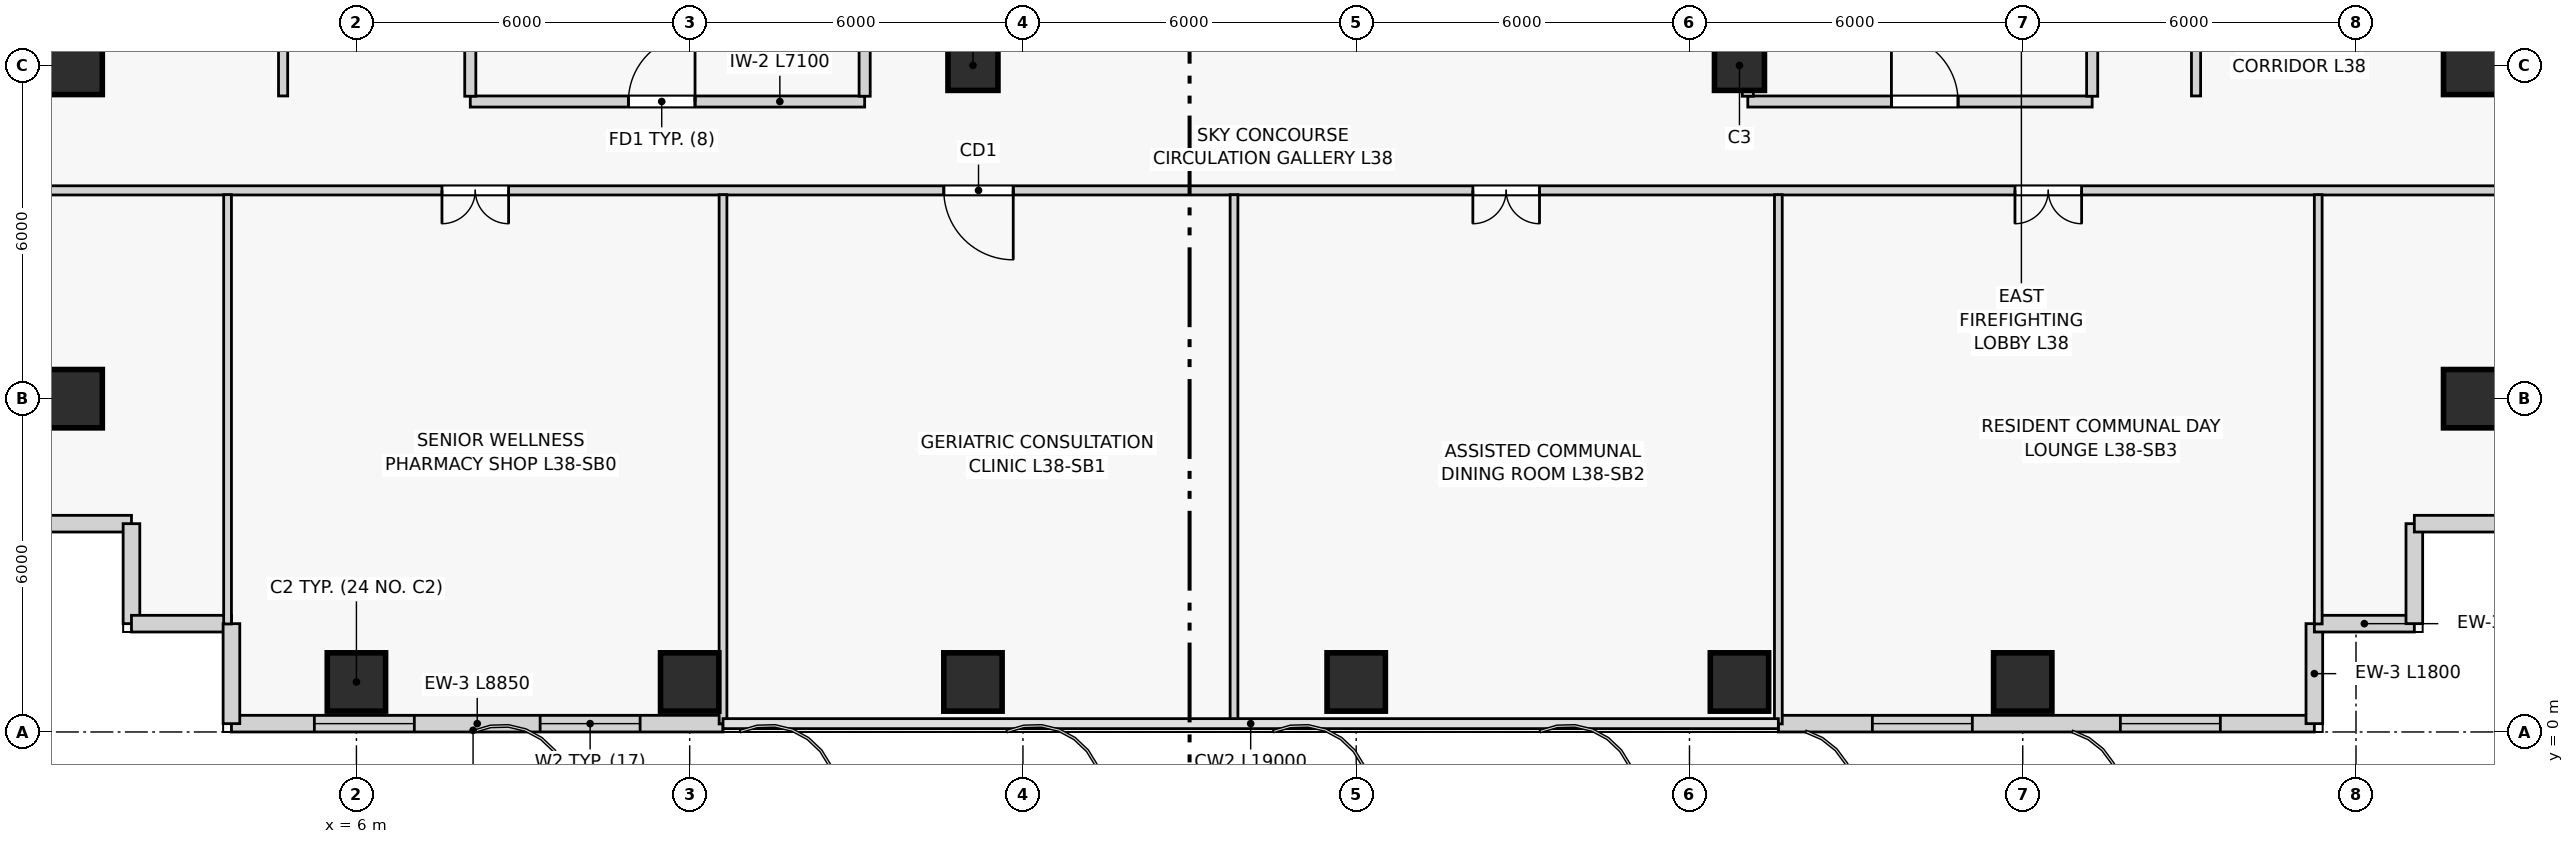
"""IFC4 building model, lengths in metres.
Left out: names, types, materials, properties, quantities, classifications, styles, units other than length and angle.
Written with IfcOpenShell. Run it as: python <this file> out.ifc"""

import sys

from ifc_helpers import new_model, si_unit, direction, frame, frame_2d, origin, origin_2d, place, context, subcontext, project, spatial, rectangle, extrude, source, transform, mapped, element, fill, save


model = new_model("IFC4")
c1 = context("Model", 3, precision=1e-05, world=origin(), true_north=direction((0.0, 1.0)))
c2 = subcontext(c1, "Body", "Model", "MODEL_VIEW")
j1 = project(units=[si_unit("LENGTHUNIT", "METRE"), si_unit("PLANEANGLEUNIT", "RADIAN")], contexts=[c1])
p1 = place(None, origin())
s1 = spatial("IfcSite", under=j1, at=p1, CompositionType="ELEMENT")
p2 = place(p1, origin())
s2 = spatial("IfcBuilding", under=s1, at=p2, CompositionType="ELEMENT")
p3 = place(p2, frame((0.0, 0.0, 144.9)))
s3 = spatial("IfcBuildingStorey", under=s2, at=p3, CompositionType="ELEMENT", Elevation=144.9)
m1 = source(origin(), c2, "Body", "SweptSolid", [
    extrude(rectangle(XDim=1.05, YDim=1.05, at=origin_2d()), origin(), (0.0, 0.0, 1.0), 3.6),
])
for number, where, z_axis, x_axis in (
    (1, (6.0, 0.9, 0.0), (0.0, 0.0, 1.0), (1.0, 0.0, 0.0)),
    (2, (12.0, 0.9, 0.0), (0.0, 0.0, 1.0), (1.0, 0.0, 0.0)),
    (3, (17.1, 0.9, 0.0), (0.0, 0.0, 1.0), (1.0, 0.0, 0.0)),
    (4, (24.0, 0.9, 0.0), (0.0, 0.0, 1.0), (1.0, 0.0, 0.0)),
    (5, (30.9, 0.9, 0.0), (0.0, 0.0, 1.0), (1.0, 0.0, 0.0)),
    (6, (36.0, 0.9, 0.0), (0.0, 0.0, 1.0), (1.0, 0.0, 0.0)),
    (7, (0.9, 6.0, 0.0), (0.0, 0.0, 1.0), (1.0, 0.0, 0.0)),
    (8, (44.1, 6.0, 0.0), (0.0, 0.0, 1.0), (1.0, 0.0, 0.0)),
    (9, (0.9, 12.0, 0.0), (0.0, 0.0, 1.0), (1.0, 0.0, 0.0)),
    (10, (44.1, 12.0, 0.0), (0.0, 0.0, 1.0), (1.0, 0.0, 0.0)),
):
    element("IfcColumn", number, at=place(p3, frame(where, z_axis=z_axis, x_axis=x_axis)), inside=s3, PredefinedType="COLUMN", context=c2, shape_type="MappedRepresentation", body=[
        mapped(m1, transform((0.0, 0.0, 0.0), scale=1.0)),
    ])
m2 = source(origin(), c2, "Body", "SweptSolid", [
    extrude(rectangle(XDim=0.9, YDim=0.9, at=origin_2d()), origin(), (0.0, 0.0, 1.0), 3.6),
])
for number, where, z_axis, x_axis in (
    (11, (17.1, 12.0, 0.0), (0.0, 0.0, 1.0), (1.0, 0.0, 0.0)),
    (12, (30.9, 12.0, 0.0), (0.0, 0.0, 1.0), (1.0, 0.0, 0.0)),
):
    element("IfcColumn", number, at=place(p3, frame(where, z_axis=z_axis, x_axis=x_axis)), inside=s3, PredefinedType="COLUMN", context=c2, shape_type="MappedRepresentation", body=[
        mapped(m2, transform((0.0, 0.0, 0.0), scale=1.0)),
    ])
p4 = place(p3, frame((3.75, 0.15, 0.0), z_axis=(0.0, 0.0, 1.0), x_axis=(1.0, 0.0, 0.0)))
e13 = element("IfcWall", 13, at=p4, inside=s3, PredefinedType="SOLIDWALL", context=c2, shape_type="SweptSolid", body=[
    extrude(rectangle(XDim=8.85, YDim=0.3, at=frame_2d((4.425, 0.0))), origin(), (0.0, 0.0, 1.0), 3.28),
])
p5 = place(p4, frame((1.492, 0.0, 0.8)))
e14 = element("IfcOpeningElement", 14, at=p5, cuts=e13, PredefinedType="OPENING", context=c2, shape_type="SweptSolid", body=[
    extrude(rectangle(XDim=1.8, YDim=2.1, at=frame_2d((0.9, 1.05))), frame((0.0, 0.16, 0.0), z_axis=(0.0, -1.0, 0.0), x_axis=(1.0, 0.0, 0.0)), (0.0, 0.0, 1.0), 0.32),
])
p6 = place(p4, frame((5.558, 0.0, 0.8)))
e15 = element("IfcOpeningElement", 15, at=p6, cuts=e13, PredefinedType="OPENING", context=c2, shape_type="SweptSolid", body=[
    extrude(rectangle(XDim=1.8, YDim=2.1, at=frame_2d((0.9, 1.05))), frame((0.0, 0.16, 0.0), z_axis=(0.0, -1.0, 0.0), x_axis=(1.0, 0.0, 0.0)), (0.0, 0.0, 1.0), 0.32),
])
p7 = place(p3, frame((31.6, 0.15, 0.0), z_axis=(0.0, 0.0, 1.0), x_axis=(1.0, 0.0, 0.0)))
e16 = element("IfcWall", 16, at=p7, inside=s3, PredefinedType="SOLIDWALL", context=c2, shape_type="SweptSolid", body=[
    extrude(rectangle(XDim=9.65, YDim=0.3, at=frame_2d((4.825, 0.0))), origin(), (0.0, 0.0, 1.0), 3.28),
])
p8 = place(p7, frame((1.692, 0.0, 0.8)))
e17 = element("IfcOpeningElement", 17, at=p8, cuts=e16, PredefinedType="OPENING", context=c2, shape_type="SweptSolid", body=[
    extrude(rectangle(XDim=1.8, YDim=2.1, at=frame_2d((0.9, 1.05))), frame((0.0, 0.16, 0.0), z_axis=(0.0, -1.0, 0.0), x_axis=(1.0, 0.0, 0.0)), (0.0, 0.0, 1.0), 0.32),
])
p9 = place(p7, frame((6.157, 0.0, 0.8)))
e18 = element("IfcOpeningElement", 18, at=p9, cuts=e16, PredefinedType="OPENING", context=c2, shape_type="SweptSolid", body=[
    extrude(rectangle(XDim=1.8, YDim=2.1, at=frame_2d((0.9, 1.05))), frame((0.0, 0.16, 0.0), z_axis=(0.0, -1.0, 0.0), x_axis=(1.0, 0.0, 0.0)), (0.0, 0.0, 1.0), 0.32),
])
for number, where, z_axis, x_axis in (
    (19, (41.25, 0.15, 0.0), (0.0, 0.0, 1.0), (0.0, 1.0, 0.0)),
    (20, (41.25, 1.95, 0.0), (0.0, 0.0, 1.0), (1.0, 0.0, 0.0)),
    (21, (43.05, 1.95, 0.0), (0.0, 0.0, 1.0), (0.0, 1.0, 0.0)),
    (22, (43.05, 3.75, 0.0), (0.0, 0.0, 1.0), (1.0, 0.0, 0.0)),
    (23, (0.15, 3.75, 0.0), (0.0, 0.0, 1.0), (1.0, 0.0, 0.0)),
    (24, (1.95, 3.75, 0.0), (0.0, 0.0, 1.0), (0.0, -1.0, 0.0)),
    (25, (1.95, 1.95, 0.0), (0.0, 0.0, 1.0), (1.0, 0.0, 0.0)),
    (26, (3.75, 1.95, 0.0), (0.0, 0.0, 1.0), (0.0, -1.0, 0.0)),
):
    element("IfcWall", number, at=place(p3, frame(where, z_axis=z_axis, x_axis=x_axis)), inside=s3, PredefinedType="SOLIDWALL", context=c2, shape_type="SweptSolid", body=[
        extrude(rectangle(XDim=1.8, YDim=0.3, at=frame_2d((0.9, 0.0))), origin(), (0.0, 0.0, 1.0), 3.28),
    ])
p10 = place(p3, frame((8.05, 11.35, 0.0), z_axis=(0.0, 0.0, 1.0), x_axis=(1.0, 0.0, 0.0)))
e27 = element("IfcWall", 27, at=p10, inside=s3, PredefinedType="PARTITIONING", context=c2, shape_type="SweptSolid", body=[
    extrude(rectangle(XDim=7.1, YDim=0.2, at=frame_2d((3.55, 0.0))), origin(), (0.0, 0.0, 1.0), 3.28),
])
p11 = place(p10, frame((2.846, 0.0, 0.0)))
e28 = element("IfcOpeningElement", 28, at=p11, cuts=e27, PredefinedType="OPENING", context=c2, shape_type="SweptSolid", body=[
    extrude(rectangle(XDim=1.2, YDim=2.2, at=frame_2d((0.6, 1.1))), frame((0.0, 0.11, 0.0), z_axis=(0.0, -1.0, 0.0), x_axis=(1.0, 0.0, 0.0)), (0.0, 0.0, 1.0), 0.22),
])
for number, where, z_axis, x_axis in (
    (29, (8.05, 11.445, 0.0), (0.0, 0.0, 1.0), (0.0, 1.0, 0.0)),
    (30, (15.15, 11.445, 0.0), (0.0, 0.0, 1.0), (0.0, 1.0, 0.0)),
):
    element("IfcWall", number, at=place(p3, frame(where, z_axis=z_axis, x_axis=x_axis)), inside=s3, PredefinedType="PARTITIONING", context=c2, shape_type="SweptSolid", body=[
        extrude(rectangle(XDim=3.135, YDim=0.2, at=frame_2d((1.567, 0.0))), origin(), (0.0, 0.0, 1.0), 3.28),
    ])
p12 = place(p3, frame((31.05, 11.35, 0.0), z_axis=(0.0, 0.0, 1.0), x_axis=(1.0, 0.0, 0.0)))
e31 = element("IfcWall", 31, at=p12, inside=s3, PredefinedType="PARTITIONING", context=c2, shape_type="SweptSolid", body=[
    extrude(rectangle(XDim=6.2, YDim=0.2, at=frame_2d((3.1, 0.0))), origin(), (0.0, 0.0, 1.0), 3.28),
])
p13 = place(p12, frame((2.586, 0.0, 0.0)))
e32 = element("IfcOpeningElement", 32, at=p13, cuts=e31, PredefinedType="OPENING", context=c2, shape_type="SweptSolid", body=[
    extrude(rectangle(XDim=1.2, YDim=2.2, at=frame_2d((0.6, 1.1))), frame((0.0, 0.11, 0.0), z_axis=(0.0, -1.0, 0.0), x_axis=(1.0, 0.0, 0.0)), (0.0, 0.0, 1.0), 0.22),
])
p14 = place(p3, frame((31.05, 11.445, 0.0), z_axis=(0.0, 0.0, 1.0), x_axis=(0.0, 1.0, 0.0)))
e33 = element("IfcWall", 33, at=p14, inside=s3, PredefinedType="PARTITIONING", context=c2, shape_type="SweptSolid", body=[
    extrude(rectangle(XDim=3.135, YDim=0.2, at=frame_2d((1.567, 0.0))), origin(), (0.0, 0.0, 1.0), 2.736),
])
p15 = place(p3, frame((37.25, 11.445, 0.0), z_axis=(0.0, 0.0, 1.0), x_axis=(0.0, 1.0, 0.0)))
e34 = element("IfcWall", 34, at=p15, inside=s3, PredefinedType="PARTITIONING", context=c2, shape_type="SweptSolid", body=[
    extrude(rectangle(XDim=3.135, YDim=0.2, at=frame_2d((1.567, 0.0))), origin(), (0.0, 0.0, 1.0), 3.28),
])
p16 = place(p3, frame((0.145, 9.75, 0.0), z_axis=(0.0, 0.0, 1.0), x_axis=(1.0, 0.0, 0.0)))
e35 = element("IfcWall", 35, at=p16, inside=s3, PredefinedType="PARTITIONING", context=c2, shape_type="SweptSolid", body=[
    extrude(rectangle(XDim=44.71, YDim=0.165, at=frame_2d((22.355, 0.0))), origin(), (0.0, 0.0, 1.0), 3.28),
])
p17 = place(p16, frame((7.395, 0.0, 0.0)))
e36 = element("IfcOpeningElement", 36, at=p17, cuts=e35, PredefinedType="OPENING", context=c2, shape_type="SweptSolid", body=[
    extrude(rectangle(XDim=1.2, YDim=2.2, at=frame_2d((0.6, 1.1))), frame((0.0, 0.093, 0.0), z_axis=(0.0, -1.0, 0.0), x_axis=(1.0, 0.0, 0.0)), (0.0, 0.0, 1.0), 0.185),
])
p18 = place(p16, frame((16.43, 0.0, 0.0)))
e37 = element("IfcOpeningElement", 37, at=p18, cuts=e35, PredefinedType="OPENING", context=c2, shape_type="SweptSolid", body=[
    extrude(rectangle(XDim=1.25, YDim=2.2, at=frame_2d((0.625, 1.1))), frame((0.0, 0.093, 0.0), z_axis=(0.0, -1.0, 0.0), x_axis=(1.0, 0.0, 0.0)), (0.0, 0.0, 1.0), 0.185),
])
p19 = place(p16, frame((25.955, 0.0, 0.0)))
e38 = element("IfcOpeningElement", 38, at=p19, cuts=e35, PredefinedType="OPENING", context=c2, shape_type="SweptSolid", body=[
    extrude(rectangle(XDim=1.2, YDim=2.2, at=frame_2d((0.6, 1.1))), frame((0.0, 0.093, 0.0), z_axis=(0.0, -1.0, 0.0), x_axis=(1.0, 0.0, 0.0)), (0.0, 0.0, 1.0), 0.185),
])
p20 = place(p16, frame((35.715, 0.0, 0.0)))
e39 = element("IfcOpeningElement", 39, at=p20, cuts=e35, PredefinedType="OPENING", context=c2, shape_type="SweptSolid", body=[
    extrude(rectangle(XDim=1.2, YDim=2.2, at=frame_2d((0.6, 1.1))), frame((0.0, 0.093, 0.0), z_axis=(0.0, -1.0, 0.0), x_axis=(1.0, 0.0, 0.0)), (0.0, 0.0, 1.0), 0.185),
])
p21 = place(p3, frame((4.68, 11.45, 0.0), z_axis=(0.0, 0.0, 1.0), x_axis=(0.0, 1.0, 0.0)))
e40 = element("IfcWall", 40, at=p21, inside=s3, PredefinedType="PARTITIONING", context=c2, shape_type="SweptSolid", body=[
    extrude(rectangle(XDim=3.7, YDim=0.165, at=frame_2d((1.85, 0.0))), origin(), (0.0, 0.0, 1.0), 3.28),
])
p22 = place(p21, frame((1.375, 0.0, 0.0)))
e41 = element("IfcOpeningElement", 41, at=p22, cuts=e40, PredefinedType="OPENING", context=c2, shape_type="SweptSolid", body=[
    extrude(rectangle(XDim=0.95, YDim=2.1, at=frame_2d((0.475, 1.05))), frame((0.0, 0.093, 0.0), z_axis=(0.0, -1.0, 0.0), x_axis=(1.0, 0.0, 0.0)), (0.0, 0.0, 1.0), 0.185),
])
p23 = place(p3, frame((39.12, 11.45, 0.0), z_axis=(0.0, 0.0, 1.0), x_axis=(0.0, 1.0, 0.0)))
e42 = element("IfcWall", 42, at=p23, inside=s3, PredefinedType="PARTITIONING", context=c2, shape_type="SweptSolid", body=[
    extrude(rectangle(XDim=18.9, YDim=0.165, at=frame_2d((9.45, 0.0))), origin(), (0.0, 0.0, 1.0), 3.28),
])
p24 = place(p23, frame((2.05, 0.0, 0.0)))
e43 = element("IfcOpeningElement", 43, at=p24, cuts=e42, PredefinedType="OPENING", context=c2, shape_type="SweptSolid", body=[
    extrude(rectangle(XDim=0.95, YDim=2.1, at=frame_2d((0.475, 1.05))), frame((0.0, 0.093, 0.0), z_axis=(0.0, -1.0, 0.0), x_axis=(1.0, 0.0, 0.0)), (0.0, 0.0, 1.0), 0.185),
])
p25 = place(p3, frame((3.68, 1.945, 0.0), z_axis=(0.0, 0.0, 1.0), x_axis=(0.0, 1.0, 0.0)))
e44 = element("IfcWall", 44, at=p25, inside=s3, PredefinedType="PARTITIONING", context=c2, shape_type="SweptSolid", body=[
    extrude(rectangle(XDim=7.728, YDim=0.14, at=frame_2d((3.864, 0.0))), origin(), (0.0, 0.0, 1.0), 3.28),
])
for number, where, z_axis, x_axis in (
    (45, (12.6, 0.145, 0.0), (0.0, 0.0, 1.0), (0.0, 1.0, 0.0)),
    (46, (21.8, 0.145, 0.0), (0.0, 0.0, 1.0), (0.0, 1.0, 0.0)),
    (47, (31.6, 0.145, 0.0), (0.0, 0.0, 1.0), (0.0, 1.0, 0.0)),
):
    element("IfcWall", number, at=place(p3, frame(where, z_axis=z_axis, x_axis=x_axis)), inside=s3, PredefinedType="PARTITIONING", context=c2, shape_type="SweptSolid", body=[
        extrude(rectangle(XDim=9.528, YDim=0.14, at=frame_2d((4.764, 0.0))), origin(), (0.0, 0.0, 1.0), 3.28),
    ])
p26 = place(p3, frame((41.32, 1.945, 0.0), z_axis=(0.0, 0.0, 1.0), x_axis=(0.0, 1.0, 0.0)))
e48 = element("IfcWall", 48, at=p26, inside=s3, PredefinedType="PARTITIONING", context=c2, shape_type="SweptSolid", body=[
    extrude(rectangle(XDim=7.728, YDim=0.14, at=frame_2d((3.864, 0.0))), origin(), (0.0, 0.0, 1.0), 3.28),
])
m3 = source(origin(), c2, "Body", "SweptSolid", [
    extrude(rectangle(XDim=1.8, YDim=2.1, at=frame_2d((0.9, 1.05))), frame((0.0, 0.03, 0.0), z_axis=(0.0, -1.0, 0.0), x_axis=(1.0, 0.0, 0.0)), (0.0, 0.0, 1.0), 0.06),
])
p27 = place(p5, origin())
e49 = element("IfcWindow", 49, at=p27, inside=s3, PartitioningType="SINGLE_PANEL", PredefinedType="WINDOW", context=c2, shape_type="MappedRepresentation", body=[
    mapped(m3, transform((0.0, 0.0, 0.0), scale=1.0)),
])
fill(e14, e49)
p28 = place(p6, origin())
e50 = element("IfcWindow", 50, at=p28, inside=s3, PartitioningType="SINGLE_PANEL", PredefinedType="WINDOW", context=c2, shape_type="MappedRepresentation", body=[
    mapped(m3, transform((0.0, 0.0, 0.0), scale=1.0)),
])
fill(e15, e50)
p29 = place(p8, origin())
e51 = element("IfcWindow", 51, at=p29, inside=s3, PartitioningType="SINGLE_PANEL", PredefinedType="WINDOW", context=c2, shape_type="MappedRepresentation", body=[
    mapped(m3, transform((0.0, 0.0, 0.0), scale=1.0)),
])
fill(e17, e51)
p30 = place(p9, origin())
e52 = element("IfcWindow", 52, at=p30, inside=s3, PartitioningType="SINGLE_PANEL", PredefinedType="WINDOW", context=c2, shape_type="MappedRepresentation", body=[
    mapped(m3, transform((0.0, 0.0, 0.0), scale=1.0)),
])
fill(e18, e52)
m4 = source(origin(), c2, "Body", "SweptSolid", [
    extrude(rectangle(XDim=1.2, YDim=2.2, at=frame_2d((0.6, 1.1))), frame((0.0, 0.025, 0.0), z_axis=(0.0, -1.0, 0.0), x_axis=(1.0, 0.0, 0.0)), (0.0, 0.0, 1.0), 0.05),
])
p31 = place(p11, origin())
e53 = element("IfcDoor", 53, at=p31, inside=s3, OperationType="SINGLE_SWING_RIGHT", PredefinedType="DOOR", context=c2, shape_type="MappedRepresentation", body=[
    mapped(m4, transform((0.0, 0.0, 0.0), scale=1.0)),
])
fill(e28, e53)
p32 = place(p13, origin())
e54 = element("IfcDoor", 54, at=p32, inside=s3, OperationType="SINGLE_SWING_LEFT", PredefinedType="DOOR", context=c2, shape_type="MappedRepresentation", body=[
    mapped(m4, transform((0.0, 0.0, 0.0), scale=1.0)),
])
fill(e32, e54)
p33 = place(p17, frame((1.2, 0.0, 0.0), z_axis=(0.0, 0.0, 1.0), x_axis=(-1.0, 0.0, 0.0)))
e55 = element("IfcDoor", 55, at=p33, inside=s3, OperationType="DOUBLE_DOOR_SINGLE_SWING", PredefinedType="DOOR", context=c2, shape_type="MappedRepresentation", body=[
    mapped(m4, transform((0.0, 0.0, 0.0), scale=1.0)),
])
fill(e36, e55)
m5 = source(origin(), c2, "Body", "SweptSolid", [
    extrude(rectangle(XDim=1.25, YDim=2.2, at=frame_2d((0.625, 1.1))), frame((0.0, 0.025, 0.0), z_axis=(0.0, -1.0, 0.0), x_axis=(1.0, 0.0, 0.0)), (0.0, 0.0, 1.0), 0.05),
])
p34 = place(p18, frame((1.25, 0.0, 0.0), z_axis=(0.0, 0.0, 1.0), x_axis=(-1.0, 0.0, 0.0)))
e56 = element("IfcDoor", 56, at=p34, inside=s3, OperationType="SINGLE_SWING_LEFT", PredefinedType="DOOR", context=c2, shape_type="MappedRepresentation", body=[
    mapped(m5, transform((0.0, 0.0, 0.0), scale=1.0)),
])
fill(e37, e56)
p35 = place(p19, frame((1.2, 0.0, 0.0), z_axis=(0.0, 0.0, 1.0), x_axis=(-1.0, 0.0, 0.0)))
e57 = element("IfcDoor", 57, at=p35, inside=s3, OperationType="DOUBLE_DOOR_SINGLE_SWING", PredefinedType="DOOR", context=c2, shape_type="MappedRepresentation", body=[
    mapped(m4, transform((0.0, 0.0, 0.0), scale=1.0)),
])
fill(e38, e57)
p36 = place(p20, frame((1.2, 0.0, 0.0), z_axis=(0.0, 0.0, 1.0), x_axis=(-1.0, 0.0, 0.0)))
e58 = element("IfcDoor", 58, at=p36, inside=s3, OperationType="DOUBLE_DOOR_SINGLE_SWING", PredefinedType="DOOR", context=c2, shape_type="MappedRepresentation", body=[
    mapped(m4, transform((0.0, 0.0, 0.0), scale=1.0)),
])
fill(e39, e58)
save(model, sys.argv[1])
